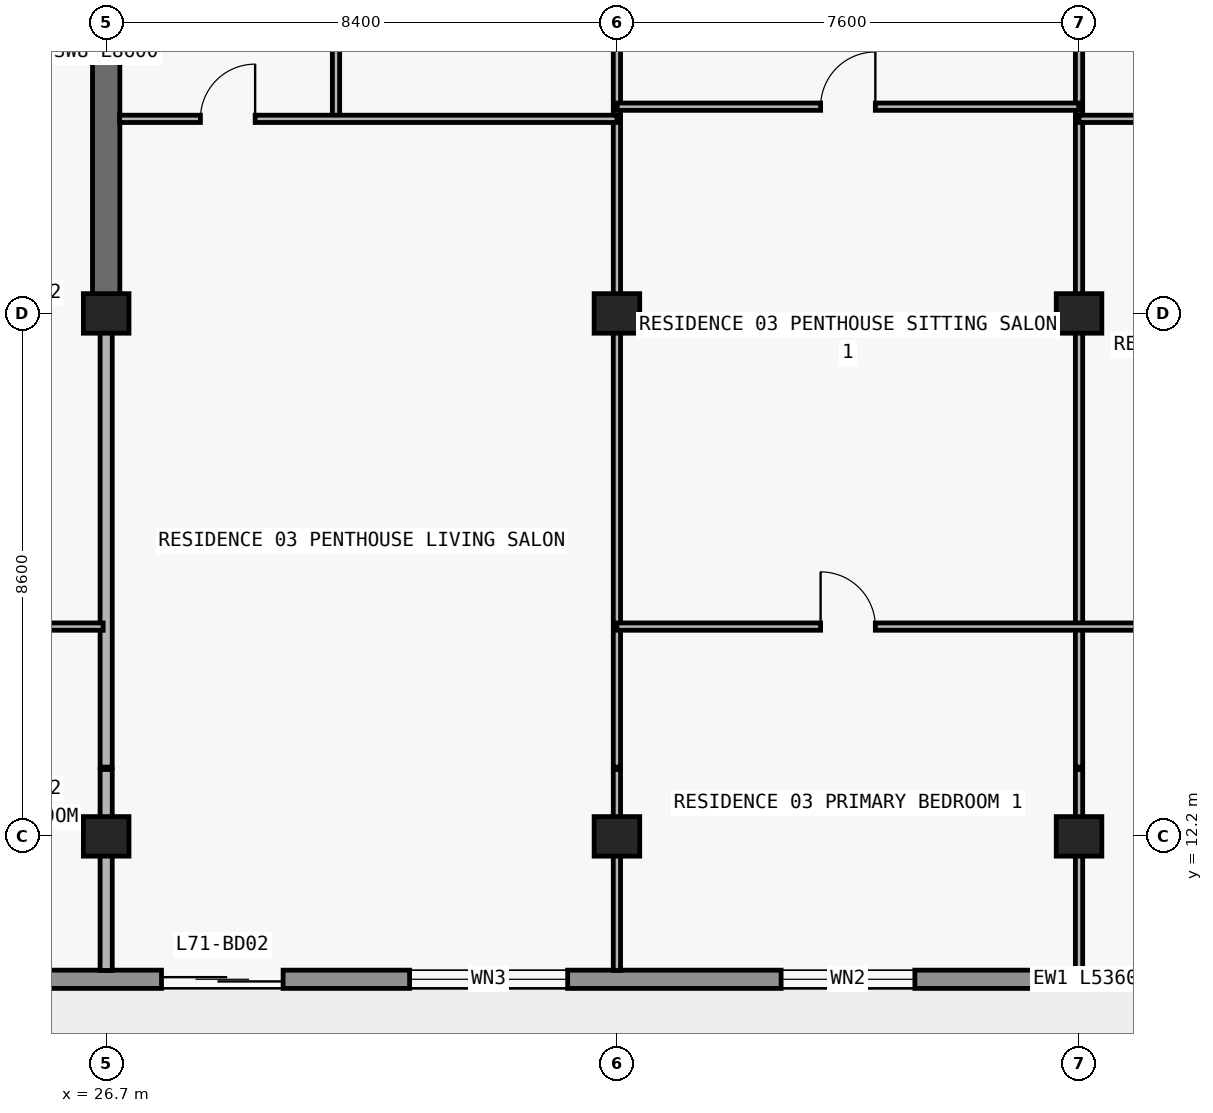
"""IFC4 building model, lengths in metres.
Left out: names, types, materials, properties, quantities, classifications, styles, units other than length and angle.
Written with IfcOpenShell. Run it as: python <this file> out.ifc"""

import sys

from ifc_helpers import new_model, si_unit, direction, frame, frame_2d, origin, origin_2d, place, context, subcontext, project, spatial, rectangle, extrude, element, fill, save


model = new_model("IFC4")
c1 = context("Model", 3, precision=1e-05, world=origin(), true_north=direction((0.0, 1.0)))
c2 = subcontext(c1, "Body", "Model", "MODEL_VIEW")
j1 = project(units=[si_unit("LENGTHUNIT", "METRE"), si_unit("PLANEANGLEUNIT", "RADIAN")], contexts=[c1])
p1 = place(None, origin())
s1 = spatial("IfcSite", under=j1, at=p1, CompositionType="ELEMENT")
p2 = place(p1, origin())
s2 = spatial("IfcBuilding", under=s1, at=p2, CompositionType="ELEMENT")
p3 = place(p2, frame((0.0, 0.0, 252.9)))
s3 = spatial("IfcBuildingStorey", under=s2, at=p3, CompositionType="ELEMENT", Elevation=252.9)
for number, where, z_axis, x_axis in (
    (1, (26.7, 12.2, 0.0), (0.0, 0.0, 1.0), (1.0, 0.0, 0.0)),
    (2, (35.1, 12.2, 0.0), (0.0, 0.0, 1.0), (1.0, 0.0, 0.0)),
    (3, (42.7, 12.2, 0.0), (0.0, 0.0, 1.0), (1.0, 0.0, 0.0)),
    (4, (26.7, 20.8, 0.0), (0.0, 0.0, 1.0), (1.0, 0.0, 0.0)),
    (5, (35.1, 20.8, 0.0), (0.0, 0.0, 1.0), (1.0, 0.0, 0.0)),
    (6, (42.7, 20.8, 0.0), (0.0, 0.0, 1.0), (1.0, 0.0, 0.0)),
):
    element("IfcColumn", number, at=place(p3, frame(where, z_axis=z_axis, x_axis=x_axis)), inside=s3, PredefinedType="COLUMN", context=c2, shape_type="SweptSolid", body=[
        extrude(rectangle(XDim=0.75, YDim=0.65, at=origin_2d()), origin(), (0.0, 0.0, 1.0), 3.05),
    ])
p4 = place(p3, frame((26.7, 20.8, 0.0), z_axis=(0.0, 0.0, 1.0), x_axis=(0.0, 1.0, 0.0)))
e7 = element("IfcWall", 7, at=p4, inside=s3, PredefinedType="SHEAR", context=c2, shape_type="SweptSolid", body=[
    extrude(rectangle(XDim=8.6, YDim=0.45, at=frame_2d((4.3, 0.0))), origin(), (0.0, 0.0, 1.0), 3.05),
])
p5 = place(p3, frame((65.7, 9.85, 0.0), z_axis=(0.0, 0.0, 1.0), x_axis=(-1.0, 0.0, 0.0)))
e8 = element("IfcWall", 8, at=p5, inside=s3, PredefinedType="STANDARD", context=c2, shape_type="SweptSolid", body=[
    extrude(rectangle(XDim=53.6, YDim=0.3, at=frame_2d((26.8, 0.0))), origin(), (0.0, 0.0, 1.0), 3.05),
])
p6 = place(p5, frame((48.05, 0.0, 0.85)))
e9 = element("IfcOpeningElement", 9, at=p6, cuts=e8, PredefinedType="OPENING", context=c2, shape_type="SweptSolid", body=[
    extrude(rectangle(XDim=1.8, YDim=1.55, at=frame_2d((0.9, 0.775))), frame((0.0, 0.16, 0.0), z_axis=(0.0, -1.0, 0.0), x_axis=(1.0, 0.0, 0.0)), (0.0, 0.0, 1.0), 0.32),
])
p7 = place(p5, frame((44.09, 0.0, 0.0)))
e10 = element("IfcOpeningElement", 10, at=p7, cuts=e8, PredefinedType="OPENING", context=c2, shape_type="SweptSolid", body=[
    extrude(rectangle(XDim=2.0, YDim=2.3, at=frame_2d((1.0, 1.15))), frame((0.0, 0.16, 0.0), z_axis=(0.0, -1.0, 0.0), x_axis=(1.0, 0.0, 0.0)), (0.0, 0.0, 1.0), 0.32),
])
p8 = place(p5, frame((39.99, 0.0, 0.85)))
e11 = element("IfcOpeningElement", 11, at=p8, cuts=e8, PredefinedType="OPENING", context=c2, shape_type="SweptSolid", body=[
    extrude(rectangle(XDim=1.8, YDim=1.55, at=frame_2d((0.9, 0.775))), frame((0.0, 0.16, 0.0), z_axis=(0.0, -1.0, 0.0), x_axis=(1.0, 0.0, 0.0)), (0.0, 0.0, 1.0), 0.32),
])
p9 = place(p5, frame((36.09, 0.0, 0.0)))
e12 = element("IfcOpeningElement", 12, at=p9, cuts=e8, PredefinedType="OPENING", context=c2, shape_type="SweptSolid", body=[
    extrude(rectangle(XDim=2.0, YDim=2.3, at=frame_2d((1.0, 1.15))), frame((0.0, 0.16, 0.0), z_axis=(0.0, -1.0, 0.0), x_axis=(1.0, 0.0, 0.0)), (0.0, 0.0, 1.0), 0.32),
])
p10 = place(p5, frame((31.41, 0.0, 0.65)))
e13 = element("IfcOpeningElement", 13, at=p10, cuts=e8, PredefinedType="OPENING", context=c2, shape_type="SweptSolid", body=[
    extrude(rectangle(XDim=2.6, YDim=1.85, at=frame_2d((1.3, 0.925))), frame((0.0, 0.16, 0.0), z_axis=(0.0, -1.0, 0.0), x_axis=(1.0, 0.0, 0.0)), (0.0, 0.0, 1.0), 0.32),
])
p11 = place(p5, frame((25.7, 0.0, 0.85)))
e14 = element("IfcOpeningElement", 14, at=p11, cuts=e8, PredefinedType="OPENING", context=c2, shape_type="SweptSolid", body=[
    extrude(rectangle(XDim=2.2, YDim=1.55, at=frame_2d((1.1, 0.775))), frame((0.0, 0.16, 0.0), z_axis=(0.0, -1.0, 0.0), x_axis=(1.0, 0.0, 0.0)), (0.0, 0.0, 1.0), 0.32),
])
p12 = place(p5, frame((17.7, 0.0, 0.85)))
e15 = element("IfcOpeningElement", 15, at=p12, cuts=e8, PredefinedType="OPENING", context=c2, shape_type="SweptSolid", body=[
    extrude(rectangle(XDim=2.2, YDim=1.55, at=frame_2d((1.1, 0.775))), frame((0.0, 0.16, 0.0), z_axis=(0.0, -1.0, 0.0), x_axis=(1.0, 0.0, 0.0)), (0.0, 0.0, 1.0), 0.32),
])
p13 = place(p5, frame((11.69, 0.0, 0.0)))
e16 = element("IfcOpeningElement", 16, at=p13, cuts=e8, PredefinedType="OPENING", context=c2, shape_type="SweptSolid", body=[
    extrude(rectangle(XDim=2.0, YDim=2.3, at=frame_2d((1.0, 1.15))), frame((0.0, 0.16, 0.0), z_axis=(0.0, -1.0, 0.0), x_axis=(1.0, 0.0, 0.0)), (0.0, 0.0, 1.0), 0.32),
])
p14 = place(p5, frame((7.01, 0.0, 0.65)))
e17 = element("IfcOpeningElement", 17, at=p14, cuts=e8, PredefinedType="OPENING", context=c2, shape_type="SweptSolid", body=[
    extrude(rectangle(XDim=2.6, YDim=1.85, at=frame_2d((1.3, 0.925))), frame((0.0, 0.16, 0.0), z_axis=(0.0, -1.0, 0.0), x_axis=(1.0, 0.0, 0.0)), (0.0, 0.0, 1.0), 0.32),
])
p15 = place(p5, frame((2.0, 0.0, 0.85)))
e18 = element("IfcOpeningElement", 18, at=p15, cuts=e8, PredefinedType="OPENING", context=c2, shape_type="SweptSolid", body=[
    extrude(rectangle(XDim=2.2, YDim=1.55, at=frame_2d((1.1, 0.775))), frame((0.0, 0.16, 0.0), z_axis=(0.0, -1.0, 0.0), x_axis=(1.0, 0.0, 0.0)), (0.0, 0.0, 1.0), 0.32),
])
p16 = place(p3, frame((26.7, 9.995, 0.0), z_axis=(0.0, 0.0, 1.0), x_axis=(0.0, 1.0, 0.0)))
e19 = element("IfcWall", 19, at=p16, inside=s3, PredefinedType="PARTITIONING", context=c2, shape_type="SweptSolid", body=[
    extrude(rectangle(XDim=3.305, YDim=0.2, at=frame_2d((1.652, 0.0))), origin(), (0.0, 0.0, 1.0), 2.263),
])
p17 = place(p3, frame((26.7, 13.34, 0.0), z_axis=(0.0, 0.0, 1.0), x_axis=(0.0, 1.0, 0.0)))
e20 = element("IfcWall", 20, at=p17, inside=s3, PredefinedType="PARTITIONING", context=c2, shape_type="SweptSolid", body=[
    extrude(rectangle(XDim=7.455, YDim=0.2, at=frame_2d((3.728, 0.0))), origin(), (0.0, 0.0, 1.0), 2.263),
])
p18 = place(p3, frame((30.48, 24.0, 0.0), z_axis=(0.0, 0.0, 1.0), x_axis=(0.0, 1.0, 0.0)))
e21 = element("IfcWall", 21, at=p18, inside=s3, PredefinedType="PARTITIONING", context=c2, shape_type="SweptSolid", body=[
    extrude(rectangle(XDim=4.8, YDim=0.12, at=frame_2d((2.4, 0.0))), origin(), (0.0, 0.0, 1.0), 3.05),
])
p19 = place(p18, frame((1.95, 0.0, 0.0)))
e22 = element("IfcOpeningElement", 22, at=p19, cuts=e21, PredefinedType="OPENING", context=c2, shape_type="SweptSolid", body=[
    extrude(rectangle(XDim=0.9, YDim=2.15, at=frame_2d((0.45, 1.075))), frame((0.0, 0.07, 0.0), z_axis=(0.0, -1.0, 0.0), x_axis=(1.0, 0.0, 0.0)), (0.0, 0.0, 1.0), 0.14),
])
p20 = place(p3, frame((35.1, 9.995, 0.0), z_axis=(0.0, 0.0, 1.0), x_axis=(0.0, 1.0, 0.0)))
e23 = element("IfcWall", 23, at=p20, inside=s3, PredefinedType="PARTITIONING", context=c2, shape_type="SweptSolid", body=[
    extrude(rectangle(XDim=3.305, YDim=0.12, at=frame_2d((1.652, 0.0))), origin(), (0.0, 0.0, 1.0), 2.263),
])
p21 = place(p3, frame((35.1, 13.34, 0.0), z_axis=(0.0, 0.0, 1.0), x_axis=(0.0, 1.0, 0.0)))
e24 = element("IfcWall", 24, at=p21, inside=s3, PredefinedType="PARTITIONING", context=c2, shape_type="SweptSolid", body=[
    extrude(rectangle(XDim=16.8, YDim=0.12, at=frame_2d((8.4, 0.0))), origin(), (0.0, 0.0, 1.0), 2.263),
])
p22 = place(p21, frame((12.61, 0.0, 0.0)))
e25 = element("IfcOpeningElement", 25, at=p22, cuts=e24, PredefinedType="OPENING", context=c2, shape_type="SweptSolid", body=[
    extrude(rectangle(XDim=0.9, YDim=2.15, at=frame_2d((0.45, 1.075))), frame((0.0, 0.07, 0.0), z_axis=(0.0, -1.0, 0.0), x_axis=(1.0, 0.0, 0.0)), (0.0, 0.0, 1.0), 0.14),
])
p23 = place(p3, frame((42.7, 9.995, 0.0), z_axis=(0.0, 0.0, 1.0), x_axis=(0.0, 1.0, 0.0)))
e26 = element("IfcWall", 26, at=p23, inside=s3, PredefinedType="PARTITIONING", context=c2, shape_type="SweptSolid", body=[
    extrude(rectangle(XDim=3.305, YDim=0.12, at=frame_2d((1.652, 0.0))), origin(), (0.0, 0.0, 1.0), 2.263),
])
p24 = place(p3, frame((42.7, 13.34, 0.0), z_axis=(0.0, 0.0, 1.0), x_axis=(0.0, 1.0, 0.0)))
e27 = element("IfcWall", 27, at=p24, inside=s3, PredefinedType="PARTITIONING", context=c2, shape_type="SweptSolid", body=[
    extrude(rectangle(XDim=16.8, YDim=0.12, at=frame_2d((8.4, 0.0))), origin(), (0.0, 0.0, 1.0), 2.263),
])
p25 = place(p24, frame((12.61, 0.0, 0.0)))
e28 = element("IfcOpeningElement", 28, at=p25, cuts=e27, PredefinedType="OPENING", context=c2, shape_type="SweptSolid", body=[
    extrude(rectangle(XDim=0.9, YDim=2.15, at=frame_2d((0.45, 1.075))), frame((0.0, 0.07, 0.0), z_axis=(0.0, -1.0, 0.0), x_axis=(1.0, 0.0, 0.0)), (0.0, 0.0, 1.0), 0.14),
])
p26 = place(p3, frame((22.92, 15.65, 0.0), z_axis=(0.0, 0.0, 1.0), x_axis=(1.0, 0.0, 0.0)))
e29 = element("IfcWall", 29, at=p26, inside=s3, PredefinedType="PARTITIONING", context=c2, shape_type="SweptSolid", body=[
    extrude(rectangle(XDim=3.73, YDim=0.12, at=frame_2d((1.865, 0.0))), origin(), (0.0, 0.0, 1.0), 3.05),
])
p27 = place(p26, frame((1.415, 0.0, 0.0)))
e30 = element("IfcOpeningElement", 30, at=p27, cuts=e29, PredefinedType="OPENING", context=c2, shape_type="SweptSolid", body=[
    extrude(rectangle(XDim=0.9, YDim=2.15, at=frame_2d((0.45, 1.075))), frame((0.0, 0.07, 0.0), z_axis=(0.0, -1.0, 0.0), x_axis=(1.0, 0.0, 0.0)), (0.0, 0.0, 1.0), 0.14),
])
p28 = place(p3, frame((35.1, 15.65, 0.0), z_axis=(0.0, 0.0, 1.0), x_axis=(1.0, 0.0, 0.0)))
e31 = element("IfcWall", 31, at=p28, inside=s3, PredefinedType="PARTITIONING", context=c2, shape_type="SweptSolid", body=[
    extrude(rectangle(XDim=16.0, YDim=0.12, at=frame_2d((8.0, 0.0))), origin(), (0.0, 0.0, 1.0), 3.05),
])
p29 = place(p28, frame((3.35, 0.0, 0.0)))
e32 = element("IfcOpeningElement", 32, at=p29, cuts=e31, PredefinedType="OPENING", context=c2, shape_type="SweptSolid", body=[
    extrude(rectangle(XDim=0.9, YDim=2.15, at=frame_2d((0.45, 1.075))), frame((0.0, 0.07, 0.0), z_axis=(0.0, -1.0, 0.0), x_axis=(1.0, 0.0, 0.0)), (0.0, 0.0, 1.0), 0.14),
])
p30 = place(p28, frame((11.35, 0.0, 0.0)))
e33 = element("IfcOpeningElement", 33, at=p30, cuts=e31, PredefinedType="OPENING", context=c2, shape_type="SweptSolid", body=[
    extrude(rectangle(XDim=0.9, YDim=2.15, at=frame_2d((0.45, 1.075))), frame((0.0, 0.07, 0.0), z_axis=(0.0, -1.0, 0.0), x_axis=(1.0, 0.0, 0.0)), (0.0, 0.0, 1.0), 0.14),
])
p31 = place(p3, frame((26.92, 24.0, 0.0), z_axis=(0.0, 0.0, 1.0), x_axis=(1.0, 0.0, 0.0)))
e34 = element("IfcWall", 34, at=p31, inside=s3, PredefinedType="PARTITIONING", context=c2, shape_type="SweptSolid", body=[
    extrude(rectangle(XDim=8.18, YDim=0.12, at=frame_2d((4.09, 0.0))), origin(), (0.0, 0.0, 1.0), 3.05),
])
p32 = place(p31, frame((1.33, 0.0, 0.0)))
e35 = element("IfcOpeningElement", 35, at=p32, cuts=e34, PredefinedType="OPENING", context=c2, shape_type="SweptSolid", body=[
    extrude(rectangle(XDim=0.9, YDim=2.15, at=frame_2d((0.45, 1.075))), frame((0.0, 0.07, 0.0), z_axis=(0.0, -1.0, 0.0), x_axis=(1.0, 0.0, 0.0)), (0.0, 0.0, 1.0), 0.14),
])
p33 = place(p3, frame((42.7, 24.0, 0.0), z_axis=(0.0, 0.0, 1.0), x_axis=(1.0, 0.0, 0.0)))
e36 = element("IfcWall", 36, at=p33, inside=s3, PredefinedType="PARTITIONING", context=c2, shape_type="SweptSolid", body=[
    extrude(rectangle(XDim=8.18, YDim=0.12, at=frame_2d((4.09, 0.0))), origin(), (0.0, 0.0, 1.0), 3.05),
])
p34 = place(p33, frame((3.64, 0.0, 0.0)))
e37 = element("IfcOpeningElement", 37, at=p34, cuts=e36, PredefinedType="OPENING", context=c2, shape_type="SweptSolid", body=[
    extrude(rectangle(XDim=0.9, YDim=2.15, at=frame_2d((0.45, 1.075))), frame((0.0, 0.07, 0.0), z_axis=(0.0, -1.0, 0.0), x_axis=(1.0, 0.0, 0.0)), (0.0, 0.0, 1.0), 0.14),
])
p35 = place(p3, frame((35.105, 24.2, 0.0), z_axis=(0.0, 0.0, 1.0), x_axis=(1.0, 0.0, 0.0)))
e38 = element("IfcWall", 38, at=p35, inside=s3, PredefinedType="PARTITIONING", context=c2, shape_type="SweptSolid", body=[
    extrude(rectangle(XDim=7.59, YDim=0.12, at=frame_2d((3.795, 0.0))), origin(), (0.0, 0.0, 1.0), 3.05),
])
p36 = place(p35, frame((3.345, 0.0, 0.0)))
e39 = element("IfcOpeningElement", 39, at=p36, cuts=e38, PredefinedType="OPENING", context=c2, shape_type="SweptSolid", body=[
    extrude(rectangle(XDim=0.9, YDim=2.15, at=frame_2d((0.45, 1.075))), frame((0.0, 0.07, 0.0), z_axis=(0.0, -1.0, 0.0), x_axis=(1.0, 0.0, 0.0)), (0.0, 0.0, 1.0), 0.14),
])
p37 = place(p9, origin())
e40 = element("IfcDoor", 40, at=p37, inside=s3, OperationType="DOUBLE_DOOR_SLIDING", PredefinedType="DOOR", context=c2, shape_type="SweptSolid", body=[
    extrude(rectangle(XDim=2.0, YDim=2.3, at=frame_2d((1.0, 1.15))), frame((0.0, 0.025, 0.0), z_axis=(0.0, -1.0, 0.0), x_axis=(1.0, 0.0, 0.0)), (0.0, 0.0, 1.0), 0.05),
])
fill(e12, e40)
p38 = place(p10, origin())
e41 = element("IfcWindow", 41, at=p38, inside=s3, PartitioningType="SINGLE_PANEL", PredefinedType="WINDOW", context=c2, shape_type="SweptSolid", body=[
    extrude(rectangle(XDim=2.6, YDim=1.85, at=frame_2d((1.3, 0.925))), frame((0.0, 0.03, 0.0), z_axis=(0.0, -1.0, 0.0), x_axis=(1.0, 0.0, 0.0)), (0.0, 0.0, 1.0), 0.06),
])
fill(e13, e41)
p39 = place(p11, origin())
e42 = element("IfcWindow", 42, at=p39, inside=s3, PartitioningType="SINGLE_PANEL", PredefinedType="WINDOW", context=c2, shape_type="SweptSolid", body=[
    extrude(rectangle(XDim=2.2, YDim=1.55, at=frame_2d((1.1, 0.775))), frame((0.0, 0.03, 0.0), z_axis=(0.0, -1.0, 0.0), x_axis=(1.0, 0.0, 0.0)), (0.0, 0.0, 1.0), 0.06),
])
fill(e14, e42)
p40 = place(p32, origin())
e43 = element("IfcDoor", 43, at=p40, inside=s3, OperationType="SINGLE_SWING_RIGHT", PredefinedType="DOOR", context=c2, shape_type="SweptSolid", body=[
    extrude(rectangle(XDim=0.9, YDim=2.15, at=frame_2d((0.45, 1.075))), frame((0.0, 0.025, 0.0), z_axis=(0.0, -1.0, 0.0), x_axis=(1.0, 0.0, 0.0)), (0.0, 0.0, 1.0), 0.05),
])
fill(e35, e43)
p41 = place(p36, origin())
e44 = element("IfcDoor", 44, at=p41, inside=s3, OperationType="SINGLE_SWING_RIGHT", PredefinedType="DOOR", context=c2, shape_type="SweptSolid", body=[
    extrude(rectangle(XDim=0.9, YDim=2.15, at=frame_2d((0.45, 1.075))), frame((0.0, 0.025, 0.0), z_axis=(0.0, -1.0, 0.0), x_axis=(1.0, 0.0, 0.0)), (0.0, 0.0, 1.0), 0.05),
])
fill(e39, e44)
p42 = place(p29, origin())
e45 = element("IfcDoor", 45, at=p42, inside=s3, OperationType="SINGLE_SWING_LEFT", PredefinedType="DOOR", context=c2, shape_type="SweptSolid", body=[
    extrude(rectangle(XDim=0.9, YDim=2.15, at=frame_2d((0.45, 1.075))), frame((0.0, 0.025, 0.0), z_axis=(0.0, -1.0, 0.0), x_axis=(1.0, 0.0, 0.0)), (0.0, 0.0, 1.0), 0.05),
])
fill(e32, e45)
save(model, sys.argv[1])
